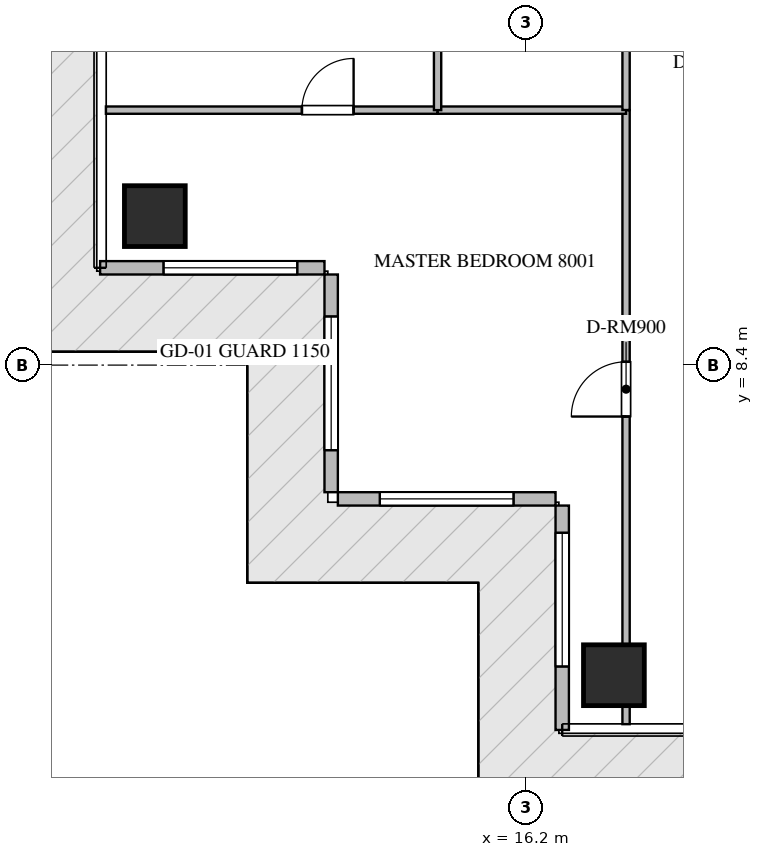
"""IFC4 building model, lengths in metres.
Left out: names, types, materials, properties, quantities, classifications, styles, units other than length and angle.
Written with IfcOpenShell. Run it as: python <this file> out.ifc"""

import sys

from ifc_helpers import new_model, si_unit, direction, frame, frame_2d, origin, origin_2d, place, context, subcontext, project, spatial, rectangle, extrude, source, transform, mapped, element, fill, save


model = new_model("IFC4")
c1 = context("Model", 3, precision=1e-05, world=origin(), true_north=direction((0.0, 1.0)))
c2 = subcontext(c1, "Body", "Model", "MODEL_VIEW")
j1 = project(units=[si_unit("LENGTHUNIT", "METRE"), si_unit("PLANEANGLEUNIT", "RADIAN")], contexts=[c1])
p1 = place(None, origin())
s1 = spatial("IfcSite", under=j1, at=p1, CompositionType="ELEMENT")
p2 = place(p1, origin())
s2 = spatial("IfcBuilding", under=s1, at=p2, CompositionType="ELEMENT")
p3 = place(p2, frame((0.0, 0.0, 321.8)))
s3 = spatial("IfcBuildingStorey", under=s2, at=p3, CompositionType="ELEMENT", Elevation=321.8)
m1 = source(origin(), c2, "Body", "SweptSolid", [
    extrude(rectangle(XDim=1.0, YDim=1.0, at=origin_2d()), origin(), (0.0, 0.0, 1.0), 4.05),
])
for number, where, z_axis, x_axis in (
    (1, (17.65, 3.3, -0.26), (0.0, 0.0, 1.0), (1.0, 0.0, 0.0)),
    (2, (10.1, 10.85, -0.26), (0.0, 0.0, 1.0), (1.0, 0.0, 0.0)),
):
    element("IfcColumn", number, at=place(p3, frame(where, z_axis=z_axis, x_axis=x_axis)), inside=s3, PredefinedType="COLUMN", context=c2, shape_type="MappedRepresentation", body=[
        mapped(m1, transform((0.0, 0.0, 0.0), scale=1.0)),
    ])
p4 = place(p3, frame((9.2, 10.0, 0.0), z_axis=(0.0, 0.0, 1.0), x_axis=(1.0, 0.0, 0.0)))
e3 = element("IfcWall", 3, at=p4, inside=s3, PredefinedType="ELEMENTEDWALL", context=c2, shape_type="SweptSolid", body=[
    extrude(rectangle(XDim=3.69, YDim=0.22, at=frame_2d((1.845, 0.0))), origin(), (0.0, 0.0, 1.0), 3.775),
])
p5 = place(p4, frame((1.043, 0.0, 0.65)))
e4 = element("IfcOpeningElement", 4, at=p5, cuts=e3, PredefinedType="OPENING", context=c2, shape_type="SweptSolid", body=[
    extrude(rectangle(XDim=2.2, YDim=2.4, at=frame_2d((1.1, 1.2))), frame((0.0, 0.12, 0.0), z_axis=(0.0, -1.0, 0.0), x_axis=(1.0, 0.0, 0.0)), (0.0, 0.0, 1.0), 0.24),
])
p6 = place(p3, frame((13.0, 9.89, 0.0), z_axis=(0.0, 0.0, 1.0), x_axis=(0.0, -1.0, 0.0)))
e5 = element("IfcWall", 5, at=p6, inside=s3, PredefinedType="ELEMENTEDWALL", context=c2, shape_type="SweptSolid", body=[
    extrude(rectangle(XDim=3.58, YDim=0.22, at=frame_2d((1.79, 0.0))), origin(), (0.0, 0.0, 1.0), 3.775),
])
p7 = place(p6, frame((0.69, 0.0, 0.65)))
e6 = element("IfcOpeningElement", 6, at=p7, cuts=e5, PredefinedType="OPENING", context=c2, shape_type="SweptSolid", body=[
    extrude(rectangle(XDim=2.2, YDim=2.4, at=frame_2d((1.1, 1.2))), frame((0.0, 0.12, 0.0), z_axis=(0.0, -1.0, 0.0), x_axis=(1.0, 0.0, 0.0)), (0.0, 0.0, 1.0), 0.24),
])
p8 = place(p3, frame((13.11, 6.2, 0.0), z_axis=(0.0, 0.0, 1.0), x_axis=(1.0, 0.0, 0.0)))
e7 = element("IfcWall", 7, at=p8, inside=s3, PredefinedType="ELEMENTEDWALL", context=c2, shape_type="SweptSolid", body=[
    extrude(rectangle(XDim=3.58, YDim=0.22, at=frame_2d((1.79, 0.0))), origin(), (0.0, 0.0, 1.0), 3.775),
])
p9 = place(p8, frame((0.69, 0.0, 0.65)))
e8 = element("IfcOpeningElement", 8, at=p9, cuts=e7, PredefinedType="OPENING", context=c2, shape_type="SweptSolid", body=[
    extrude(rectangle(XDim=2.2, YDim=2.4, at=frame_2d((1.1, 1.2))), frame((0.0, 0.12, 0.0), z_axis=(0.0, -1.0, 0.0), x_axis=(1.0, 0.0, 0.0)), (0.0, 0.0, 1.0), 0.24),
])
p10 = place(p3, frame((16.8, 6.09, 0.0), z_axis=(0.0, 0.0, 1.0), x_axis=(0.0, -1.0, 0.0)))
e9 = element("IfcWall", 9, at=p10, inside=s3, PredefinedType="ELEMENTEDWALL", context=c2, shape_type="SweptSolid", body=[
    extrude(rectangle(XDim=3.69, YDim=0.22, at=frame_2d((1.845, 0.0))), origin(), (0.0, 0.0, 1.0), 3.775),
])
p11 = place(p10, frame((0.447, 0.0, 0.65)))
e10 = element("IfcOpeningElement", 10, at=p11, cuts=e9, PredefinedType="OPENING", context=c2, shape_type="SweptSolid", body=[
    extrude(rectangle(XDim=2.2, YDim=2.4, at=frame_2d((1.1, 1.2))), frame((0.0, 0.12, 0.0), z_axis=(0.0, -1.0, 0.0), x_axis=(1.0, 0.0, 0.0)), (0.0, 0.0, 1.0), 0.24),
])
p12 = place(p3, frame((17.85, 2.495, 0.0), z_axis=(0.0, 0.0, 1.0), x_axis=(0.0, 1.0, 0.0)))
e11 = element("IfcWall", 11, at=p12, inside=s3, PredefinedType="PARTITIONING", context=c2, shape_type="SweptSolid", body=[
    extrude(rectangle(XDim=10.098, YDim=0.12, at=frame_2d((5.049, 0.0))), origin(), (0.0, 0.0, 1.0), 3.292),
])
p13 = place(p12, frame((5.059, 0.0, 0.0)))
e12 = element("IfcOpeningElement", 12, at=p13, cuts=e11, PredefinedType="OPENING", context=c2, shape_type="SweptSolid", body=[
    extrude(rectangle(XDim=0.9, YDim=2.1, at=frame_2d((0.45, 1.05))), frame((0.0, 0.07, 0.0), z_axis=(0.0, -1.0, 0.0), x_axis=(1.0, 0.0, 0.0)), (0.0, 0.0, 1.0), 0.14),
])
p14 = place(p3, frame((9.295, 12.593, 0.0), z_axis=(0.0, 0.0, 1.0), x_axis=(1.0, 0.0, 0.0)))
e13 = element("IfcWall", 13, at=p14, inside=s3, PredefinedType="PARTITIONING", context=c2, shape_type="SweptSolid", body=[
    extrude(rectangle(XDim=5.455, YDim=0.12, at=frame_2d((2.728, 0.0))), origin(), (0.0, 0.0, 1.0), 3.79),
])
p15 = place(p14, frame((3.224, 0.0, 0.0)))
e14 = element("IfcOpeningElement", 14, at=p15, cuts=e13, PredefinedType="OPENING", context=c2, shape_type="SweptSolid", body=[
    extrude(rectangle(XDim=0.85, YDim=2.1, at=frame_2d((0.425, 1.05))), frame((0.0, 0.07, 0.0), z_axis=(0.0, -1.0, 0.0), x_axis=(1.0, 0.0, 0.0)), (0.0, 0.0, 1.0), 0.14),
])
p16 = place(p3, frame((14.752, 12.593, 0.0), z_axis=(0.0, 0.0, 1.0), x_axis=(1.0, 0.0, 0.0)))
e15 = element("IfcWall", 15, at=p16, inside=s3, PredefinedType="PARTITIONING", context=c2, shape_type="SweptSolid", body=[
    extrude(rectangle(XDim=3.098, YDim=0.12, at=frame_2d((1.549, 0.0))), origin(), (0.0, 0.0, 1.0), 3.79),
])
p17 = place(p3, frame((14.75, 12.593, 0.0), z_axis=(0.0, 0.0, 1.0), x_axis=(0.0, 1.0, 0.0)))
e16 = element("IfcWall", 16, at=p17, inside=s3, PredefinedType="PARTITIONING", context=c2, shape_type="SweptSolid", body=[
    extrude(rectangle(XDim=4.267, YDim=0.12, at=frame_2d((2.134, 0.0))), origin(), (0.0, 0.0, 1.0), 3.79),
])
p18 = place(p3, frame((17.85, 12.595, 0.0), z_axis=(0.0, 0.0, 1.0), x_axis=(0.0, 1.0, 0.0)))
e17 = element("IfcWall", 17, at=p18, inside=s3, PredefinedType="PARTITIONING", context=c2, shape_type="SweptSolid", body=[
    extrude(rectangle(XDim=4.265, YDim=0.12, at=frame_2d((2.133, 0.0))), origin(), (0.0, 0.0, 1.0), 3.372),
])
p19 = place(p18, frame((1.847, 0.0, 0.0)))
e18 = element("IfcOpeningElement", 18, at=p19, cuts=e17, PredefinedType="OPENING", context=c2, shape_type="SweptSolid", body=[
    extrude(rectangle(XDim=0.85, YDim=2.1, at=frame_2d((0.425, 1.05))), frame((0.0, 0.07, 0.0), z_axis=(0.0, -1.0, 0.0), x_axis=(1.0, 0.0, 0.0)), (0.0, 0.0, 1.0), 0.14),
])
m2 = source(origin(), c2, "Body", "SweptSolid", [
    extrude(rectangle(XDim=2.2, YDim=2.4, at=frame_2d((1.1, 1.2))), frame((0.0, 0.03, 0.0), z_axis=(0.0, -1.0, 0.0), x_axis=(1.0, 0.0, 0.0)), (0.0, 0.0, 1.0), 0.06),
])
p20 = place(p5, origin())
e19 = element("IfcWindow", 19, at=p20, inside=s3, PartitioningType="SINGLE_PANEL", PredefinedType="WINDOW", context=c2, shape_type="MappedRepresentation", body=[
    mapped(m2, transform((0.0, 0.0, 0.0), scale=1.0)),
])
fill(e4, e19)
p21 = place(p7, origin())
e20 = element("IfcWindow", 20, at=p21, inside=s3, PartitioningType="SINGLE_PANEL", PredefinedType="WINDOW", context=c2, shape_type="MappedRepresentation", body=[
    mapped(m2, transform((0.0, 0.0, 0.0), scale=1.0)),
])
fill(e6, e20)
p22 = place(p9, origin())
e21 = element("IfcWindow", 21, at=p22, inside=s3, PartitioningType="SINGLE_PANEL", PredefinedType="WINDOW", context=c2, shape_type="MappedRepresentation", body=[
    mapped(m2, transform((0.0, 0.0, 0.0), scale=1.0)),
])
fill(e8, e21)
p23 = place(p11, origin())
e22 = element("IfcWindow", 22, at=p23, inside=s3, PartitioningType="SINGLE_PANEL", PredefinedType="WINDOW", context=c2, shape_type="MappedRepresentation", body=[
    mapped(m2, transform((0.0, 0.0, 0.0), scale=1.0)),
])
fill(e10, e22)
m3 = source(origin(), c2, "Body", "SweptSolid", [
    extrude(rectangle(XDim=0.9, YDim=2.1, at=frame_2d((0.45, 1.05))), frame((0.0, 0.025, 0.0), z_axis=(0.0, -1.0, 0.0), x_axis=(1.0, 0.0, 0.0)), (0.0, 0.0, 1.0), 0.05),
])
p24 = place(p13, origin())
e23 = element("IfcDoor", 23, at=p24, inside=s3, OperationType="SINGLE_SWING_LEFT", PredefinedType="DOOR", context=c2, shape_type="MappedRepresentation", body=[
    mapped(m3, transform((0.0, 0.0, 0.0), scale=1.0)),
])
fill(e12, e23)
m4 = source(origin(), c2, "Body", "SweptSolid", [
    extrude(rectangle(XDim=0.85, YDim=2.1, at=frame_2d((0.425, 1.05))), frame((0.0, 0.025, 0.0), z_axis=(0.0, -1.0, 0.0), x_axis=(1.0, 0.0, 0.0)), (0.0, 0.0, 1.0), 0.05),
])
p25 = place(p15, origin())
e24 = element("IfcDoor", 24, at=p25, inside=s3, OperationType="SINGLE_SWING_RIGHT", PredefinedType="DOOR", context=c2, shape_type="MappedRepresentation", body=[
    mapped(m4, transform((0.0, 0.0, 0.0), scale=1.0)),
])
fill(e14, e24)
save(model, sys.argv[1])
